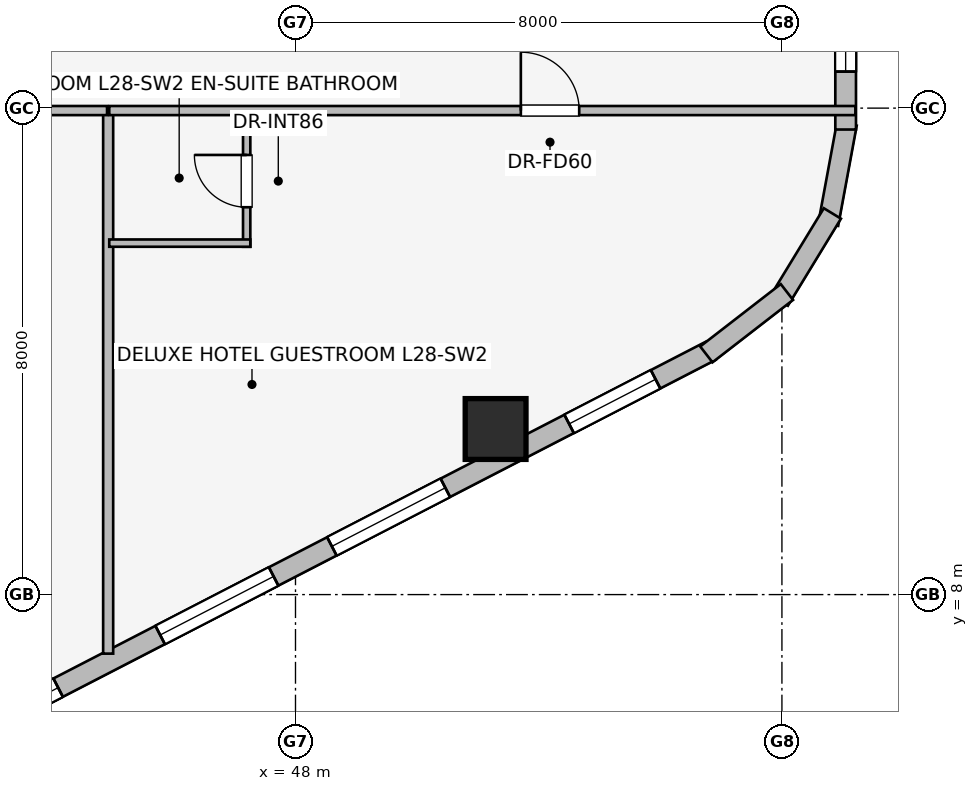
"""IFC4 building model, lengths in metres.
Left out: names, types, materials, properties, quantities, classifications, styles, units other than length and angle.
Written with IfcOpenShell. Run it as: python <this file> out.ifc"""

import sys

from ifc_helpers import new_model, si_unit, direction, frame, frame_2d, origin, origin_2d, place, context, subcontext, project, spatial, rectangle, extrude, element, fill, save


model = new_model("IFC4")
c1 = context("Model", 3, precision=1e-05, world=origin(), true_north=direction((0.0, 1.0)))
c2 = subcontext(c1, "Body", "Model", "MODEL_VIEW")
j1 = project(units=[si_unit("LENGTHUNIT", "METRE"), si_unit("PLANEANGLEUNIT", "RADIAN")], contexts=[c1])
p1 = place(None, origin())
s1 = spatial("IfcSite", under=j1, at=p1, CompositionType="ELEMENT")
p2 = place(p1, origin())
s2 = spatial("IfcBuilding", under=s1, at=p2, CompositionType="ELEMENT")
p3 = place(p2, frame((0.0, 0.0, 108.45)))
s3 = spatial("IfcBuildingStorey", under=s2, at=p3, CompositionType="ELEMENT", Elevation=108.45)
p4 = place(p3, frame((51.291, 10.723, 0.0), z_axis=(0.0, 0.0, 1.0), x_axis=(1.0, 0.0, 0.0)))
e1 = element("IfcColumn", 1, at=p4, inside=s3, PredefinedType="COLUMN", context=c2, shape_type="SweptSolid", body=[
    extrude(rectangle(XDim=1.0, YDim=1.0, at=origin_2d()), origin(), (0.0, 0.0, 1.0), 3.45),
])
p5 = place(p3, frame((54.831, 12.01, 0.0), z_axis=(0.0, 0.0, 1.0), x_axis=(-0.888613612362, -0.458656568606, 0.0)))
e2 = element("IfcWall", 2, at=p5, inside=s3, PredefinedType="STANDARD", context=c2, shape_type="SweptSolid", body=[
    extrude(rectangle(XDim=18.681, YDim=0.34, at=frame_2d((9.34, 0.0))), origin(), (0.0, 0.0, 1.0), 3.16),
])
p6 = place(p5, frame((1.023, 0.0, 0.75)))
e3 = element("IfcOpeningElement", 3, at=p6, cuts=e2, PredefinedType="OPENING", context=c2, shape_type="SweptSolid", body=[
    extrude(rectangle(XDim=1.6, YDim=1.55, at=frame_2d((0.8, 0.775))), frame((0.0, 0.18, 0.0), z_axis=(0.0, -1.0, 0.0), x_axis=(1.0, 0.0, 0.0)), (0.0, 0.0, 1.0), 0.36),
])
p7 = place(p5, frame((4.914, 0.0, 0.75)))
e4 = element("IfcOpeningElement", 4, at=p7, cuts=e2, PredefinedType="OPENING", context=c2, shape_type="SweptSolid", body=[
    extrude(rectangle(XDim=2.1, YDim=1.5, at=frame_2d((1.05, 0.75))), frame((0.0, 0.18, 0.0), z_axis=(0.0, -1.0, 0.0), x_axis=(1.0, 0.0, 0.0)), (0.0, 0.0, 1.0), 0.36),
])
p8 = place(p5, frame((8.092, 0.0, 0.75)))
e5 = element("IfcOpeningElement", 5, at=p8, cuts=e2, PredefinedType="OPENING", context=c2, shape_type="SweptSolid", body=[
    extrude(rectangle(XDim=2.1, YDim=1.5, at=frame_2d((1.05, 0.75))), frame((0.0, 0.18, 0.0), z_axis=(0.0, -1.0, 0.0), x_axis=(1.0, 0.0, 0.0)), (0.0, 0.0, 1.0), 0.36),
])
p9 = place(p5, frame((12.08, 0.0, 0.75)))
e6 = element("IfcOpeningElement", 6, at=p9, cuts=e2, PredefinedType="OPENING", context=c2, shape_type="SweptSolid", body=[
    extrude(rectangle(XDim=1.6, YDim=1.55, at=frame_2d((0.8, 0.775))), frame((0.0, 0.18, 0.0), z_axis=(0.0, -1.0, 0.0), x_axis=(1.0, 0.0, 0.0)), (0.0, 0.0, 1.0), 0.36),
])
p10 = place(p5, frame((15.808, 0.0, 0.75)))
e7 = element("IfcOpeningElement", 7, at=p10, cuts=e2, PredefinedType="OPENING", context=c2, shape_type="SweptSolid", body=[
    extrude(rectangle(XDim=2.1, YDim=1.5, at=frame_2d((1.05, 0.75))), frame((0.0, 0.18, 0.0), z_axis=(0.0, -1.0, 0.0), x_axis=(1.0, 0.0, 0.0)), (0.0, 0.0, 1.0), 0.36),
])
p11 = place(p3, frame((57.068, 15.742, 0.0), z_axis=(0.0, 0.0, 1.0), x_axis=(-0.181984991895, -0.983301308209, 0.0)))
e8 = element("IfcWall", 8, at=p11, inside=s3, PredefinedType="STANDARD", context=c2, shape_type="SweptSolid", body=[
    extrude(rectangle(XDim=1.677, YDim=0.33, at=frame_2d((0.838, 0.0))), origin(), (0.0, 0.0, 1.0), 3.16),
])
p12 = place(p3, frame((56.83, 14.268, 0.0), z_axis=(0.0, 0.0, 1.0), x_axis=(-0.520519429557, -0.853849824883, 0.0)))
e9 = element("IfcWall", 9, at=p12, inside=s3, PredefinedType="STANDARD", context=c2, shape_type="SweptSolid", body=[
    extrude(rectangle(XDim=1.677, YDim=0.33, at=frame_2d((0.839, 0.0))), origin(), (0.0, 0.0, 1.0), 3.16),
])
p13 = place(p3, frame((56.082, 12.976, 0.0), z_axis=(0.0, 0.0, 1.0), x_axis=(-0.790621329885, -0.612305408053, 0.0)))
e10 = element("IfcWall", 10, at=p13, inside=s3, PredefinedType="STANDARD", context=c2, shape_type="SweptSolid", body=[
    extrude(rectangle(XDim=1.676, YDim=0.33, at=frame_2d((0.838, 0.0))), origin(), (0.0, 0.0, 1.0), 3.16),
])
p14 = place(p3, frame((57.048, 20.325, 0.0), z_axis=(0.0, 0.0, 1.0), x_axis=(0.0, -1.0, 0.0)))
e11 = element("IfcWall", 11, at=p14, inside=s3, PredefinedType="STANDARD", context=c2, shape_type="SweptSolid", body=[
    extrude(rectangle(XDim=4.677, YDim=0.34, at=frame_2d((2.338, 0.0))), origin(), (0.0, 0.0, 1.0), 3.16),
])
p15 = place(p14, frame((2.675, 0.0, 0.75)))
e12 = element("IfcOpeningElement", 12, at=p15, cuts=e11, PredefinedType="OPENING", context=c2, shape_type="SweptSolid", body=[
    extrude(rectangle(XDim=1.05, YDim=1.4, at=frame_2d((0.525, 0.7))), frame((0.0, 0.18, 0.0), z_axis=(0.0, -1.0, 0.0), x_axis=(1.0, 0.0, 0.0)), (0.0, 0.0, 1.0), 0.36),
])
p16 = place(p3, frame((44.919, 7.029, 0.0), z_axis=(0.0, 0.0, 1.0), x_axis=(0.0, 1.0, 0.0)))
e13 = element("IfcWall", 13, at=p16, inside=s3, PredefinedType="PARTITIONING", context=c2, shape_type="SweptSolid", body=[
    extrude(rectangle(XDim=8.901, YDim=0.165, at=frame_2d((4.45, 0.0))), origin(), (0.0, 0.0, 1.0), 3.16),
])
p17 = place(p3, frame((32.85, 15.96, 0.0), z_axis=(0.0, 0.0, 1.0), x_axis=(1.0, 0.0, 0.0)))
e14 = element("IfcWall", 14, at=p17, inside=s3, PredefinedType="PARTITIONING", context=c2, shape_type="SweptSolid", body=[
    extrude(rectangle(XDim=12.051, YDim=0.15, at=frame_2d((6.025, 0.0))), origin(), (0.0, 0.0, 1.0), 3.16),
])
p18 = place(p17, frame((5.546, 0.0, 0.0)))
e15 = element("IfcOpeningElement", 15, at=p18, cuts=e14, PredefinedType="OPENING", context=c2, shape_type="SweptSolid", body=[
    extrude(rectangle(XDim=0.96, YDim=2.0, at=frame_2d((0.48, 1.0))), frame((0.0, 0.085, 0.0), z_axis=(0.0, -1.0, 0.0), x_axis=(1.0, 0.0, 0.0)), (0.0, 0.0, 1.0), 0.17),
])
p19 = place(p3, frame((47.197, 13.72, 0.0), z_axis=(0.0, 0.0, 1.0), x_axis=(0.0, 1.0, 0.0)))
e16 = element("IfcWall", 16, at=p19, inside=s3, PredefinedType="PARTITIONING", context=c2, shape_type="SweptSolid", body=[
    extrude(rectangle(XDim=2.24, YDim=0.12, at=frame_2d((1.12, 0.0))), origin(), (0.0, 0.0, 1.0), 3.16),
])
p20 = place(p19, frame((0.65, 0.0, 0.0)))
e17 = element("IfcOpeningElement", 17, at=p20, cuts=e16, PredefinedType="OPENING", context=c2, shape_type="SweptSolid", body=[
    extrude(rectangle(XDim=0.86, YDim=2.0, at=frame_2d((0.43, 1.0))), frame((0.0, 0.07, 0.0), z_axis=(0.0, -1.0, 0.0), x_axis=(1.0, 0.0, 0.0)), (0.0, 0.0, 1.0), 0.14),
])
p21 = place(p3, frame((44.937, 13.78, 0.0), z_axis=(0.0, 0.0, 1.0), x_axis=(1.0, 0.0, 0.0)))
e18 = element("IfcWall", 18, at=p21, inside=s3, PredefinedType="PARTITIONING", context=c2, shape_type="SweptSolid", body=[
    extrude(rectangle(XDim=2.32, YDim=0.12, at=frame_2d((1.16, 0.0))), origin(), (0.0, 0.0, 1.0), 3.16),
])
p22 = place(p3, frame((44.937, 15.96, 0.0), z_axis=(0.0, 0.0, 1.0), x_axis=(1.0, 0.0, 0.0)))
e19 = element("IfcWall", 19, at=p22, inside=s3, PredefinedType="PARTITIONING", context=c2, shape_type="SweptSolid", body=[
    extrude(rectangle(XDim=12.271, YDim=0.15, at=frame_2d((6.135, 0.0))), origin(), (0.0, 0.0, 1.0), 3.16),
])
p23 = place(p22, frame((6.769, 0.0, 0.0)))
e20 = element("IfcOpeningElement", 20, at=p23, cuts=e19, PredefinedType="OPENING", context=c2, shape_type="SweptSolid", body=[
    extrude(rectangle(XDim=0.96, YDim=2.0, at=frame_2d((0.48, 1.0))), frame((0.0, 0.085, 0.0), z_axis=(0.0, -1.0, 0.0), x_axis=(1.0, 0.0, 0.0)), (0.0, 0.0, 1.0), 0.17),
])
p24 = place(p6, origin())
e21 = element("IfcWindow", 21, at=p24, inside=s3, PartitioningType="SINGLE_PANEL", PredefinedType="WINDOW", context=c2, shape_type="SweptSolid", body=[
    extrude(rectangle(XDim=1.6, YDim=1.55, at=frame_2d((0.8, 0.775))), frame((0.0, 0.03, 0.0), z_axis=(0.0, -1.0, 0.0), x_axis=(1.0, 0.0, 0.0)), (0.0, 0.0, 1.0), 0.06),
])
fill(e3, e21)
p25 = place(p7, origin())
e22 = element("IfcWindow", 22, at=p25, inside=s3, PartitioningType="SINGLE_PANEL", PredefinedType="WINDOW", context=c2, shape_type="SweptSolid", body=[
    extrude(rectangle(XDim=2.1, YDim=1.5, at=frame_2d((1.05, 0.75))), frame((0.0, 0.03, 0.0), z_axis=(0.0, -1.0, 0.0), x_axis=(1.0, 0.0, 0.0)), (0.0, 0.0, 1.0), 0.06),
])
fill(e4, e22)
p26 = place(p8, origin())
e23 = element("IfcWindow", 23, at=p26, inside=s3, PartitioningType="SINGLE_PANEL", PredefinedType="WINDOW", context=c2, shape_type="SweptSolid", body=[
    extrude(rectangle(XDim=2.1, YDim=1.5, at=frame_2d((1.05, 0.75))), frame((0.0, 0.03, 0.0), z_axis=(0.0, -1.0, 0.0), x_axis=(1.0, 0.0, 0.0)), (0.0, 0.0, 1.0), 0.06),
])
fill(e5, e23)
p27 = place(p9, origin())
e24 = element("IfcWindow", 24, at=p27, inside=s3, PartitioningType="SINGLE_PANEL", PredefinedType="WINDOW", context=c2, shape_type="SweptSolid", body=[
    extrude(rectangle(XDim=1.6, YDim=1.55, at=frame_2d((0.8, 0.775))), frame((0.0, 0.03, 0.0), z_axis=(0.0, -1.0, 0.0), x_axis=(1.0, 0.0, 0.0)), (0.0, 0.0, 1.0), 0.06),
])
fill(e6, e24)
p28 = place(p15, origin())
e25 = element("IfcWindow", 25, at=p28, inside=s3, PartitioningType="SINGLE_PANEL", PredefinedType="WINDOW", context=c2, shape_type="SweptSolid", body=[
    extrude(rectangle(XDim=1.05, YDim=1.4, at=frame_2d((0.525, 0.7))), frame((0.0, 0.03, 0.0), z_axis=(0.0, -1.0, 0.0), x_axis=(1.0, 0.0, 0.0)), (0.0, 0.0, 1.0), 0.06),
])
fill(e12, e25)
p29 = place(p20, origin())
e26 = element("IfcDoor", 26, at=p29, inside=s3, OperationType="SINGLE_SWING_RIGHT", PredefinedType="DOOR", context=c2, shape_type="SweptSolid", body=[
    extrude(rectangle(XDim=0.86, YDim=2.0, at=frame_2d((0.43, 1.0))), frame((0.0, 0.025, 0.0), z_axis=(0.0, -1.0, 0.0), x_axis=(1.0, 0.0, 0.0)), (0.0, 0.0, 1.0), 0.05),
])
fill(e17, e26)
p30 = place(p23, origin())
e27 = element("IfcDoor", 27, at=p30, inside=s3, OperationType="SINGLE_SWING_LEFT", PredefinedType="DOOR", context=c2, shape_type="SweptSolid", body=[
    extrude(rectangle(XDim=0.96, YDim=2.0, at=frame_2d((0.48, 1.0))), frame((0.0, 0.025, 0.0), z_axis=(0.0, -1.0, 0.0), x_axis=(1.0, 0.0, 0.0)), (0.0, 0.0, 1.0), 0.05),
])
fill(e20, e27)
save(model, sys.argv[1])
